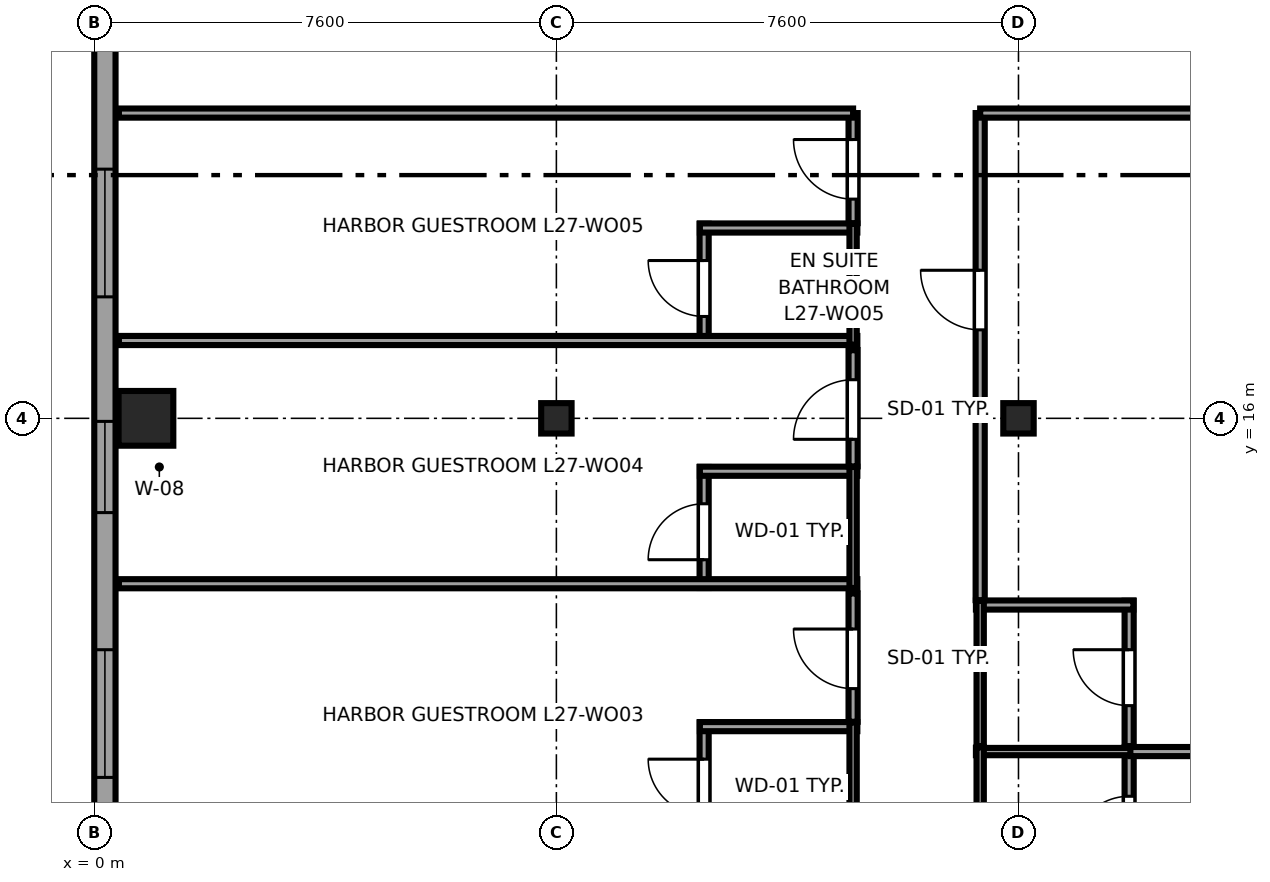
"""IFC4 building model, lengths in metres.
Left out: names, types, materials, properties, quantities, classifications, styles, units other than length and angle.
Written with IfcOpenShell. Run it as: python <this file> out.ifc"""

import sys

from ifc_helpers import new_model, si_unit, direction, frame, frame_2d, origin, origin_2d, place, context, subcontext, project, spatial, rectangle, i_section, extrude, source, transform, mapped, element, fill, save


model = new_model("IFC4")
c1 = context("Model", 3, precision=1e-05, world=origin(), true_north=direction((0.0, 1.0)))
c2 = subcontext(c1, "Body", "Model", "MODEL_VIEW")
j1 = project(units=[si_unit("LENGTHUNIT", "METRE"), si_unit("PLANEANGLEUNIT", "RADIAN")], contexts=[c1])
p1 = place(None, origin())
s1 = spatial("IfcSite", under=j1, at=p1, CompositionType="ELEMENT")
p2 = place(p1, origin())
s2 = spatial("IfcBuilding", under=s1, at=p2, CompositionType="ELEMENT")
p3 = place(p2, frame((0.0, 0.0, 108.0)))
s3 = spatial("IfcBuildingStorey", under=s2, at=p3, CompositionType="ELEMENT", Elevation=108.0)
m1 = source(origin(), c2, "Body", "SweptSolid", [
    extrude(rectangle(XDim=0.9, YDim=0.9, at=origin_2d()), origin(), (0.0, 0.0, 1.0), 3.55),
])
p4 = place(p3, frame((0.85, 16.0, 0.0), z_axis=(0.0, 0.0, 1.0), x_axis=(1.0, 0.0, 0.0)))
e1 = element("IfcColumn", 1, at=p4, inside=s3, PredefinedType="COLUMN", context=c2, shape_type="MappedRepresentation", body=[
    mapped(m1, transform((0.0, 0.0, 0.0), x_axis=(1.0, 0.0, 0.0), y_axis=(0.0, 1.0, 0.0), z_axis=(0.0, 0.0, 1.0), scale=1.0)),
])
m2 = source(origin(), c2, "Body", "SweptSolid", [
    extrude(i_section(OverallWidth=0.5, OverallDepth=0.5, WebThickness=0.022, FlangeThickness=0.034, at=origin_2d()), origin(), (0.0, 0.0, 1.0), 3.55),
])
for number, where, z_axis, x_axis in (
    (2, (7.6, 16.0, 0.0), (0.0, 0.0, 1.0), (1.0, 0.0, 0.0)),
    (3, (15.2, 16.0, 0.0), (0.0, 0.0, 1.0), (1.0, 0.0, 0.0)),
):
    element("IfcColumn", number, at=place(p3, frame(where, z_axis=z_axis, x_axis=x_axis)), inside=s3, PredefinedType="COLUMN", context=c2, shape_type="MappedRepresentation", body=[
        mapped(m2, transform((0.0, 0.0, 0.0), x_axis=(1.0, 0.0, 0.0), y_axis=(0.0, 1.0, 0.0), z_axis=(0.0, 0.0, 1.0), scale=1.0)),
    ])
p5 = place(p3, frame((0.175, 41.383, 0.0), z_axis=(0.0, 0.0, 1.0), x_axis=(0.0, -1.0, 0.0)))
e4 = element("IfcWall", 4, at=p5, inside=s3, PredefinedType="SOLIDWALL", context=c2, shape_type="SweptSolid", body=[
    extrude(rectangle(XDim=36.766, YDim=0.35, at=frame_2d((18.383, 0.0))), origin(), (0.0, 0.0, 1.0), 3.37),
])
p6 = place(p5, frame((4.428, 0.0, 0.68)))
e5 = element("IfcOpeningElement", 5, at=p6, cuts=e4, PredefinedType="OPENING", context=c2, shape_type="SweptSolid", body=[
    extrude(rectangle(XDim=2.1, YDim=1.9, at=frame_2d((1.05, 0.95))), frame((0.0, 0.185, 0.0), z_axis=(0.0, -1.0, 0.0), x_axis=(1.0, 0.0, 0.0)), (0.0, 0.0, 1.0), 0.37),
])
p7 = place(p5, frame((10.479, 0.0, 0.68)))
e6 = element("IfcOpeningElement", 6, at=p7, cuts=e4, PredefinedType="OPENING", context=c2, shape_type="SweptSolid", body=[
    extrude(rectangle(XDim=2.1, YDim=1.9, at=frame_2d((1.05, 0.95))), frame((0.0, 0.185, 0.0), z_axis=(0.0, -1.0, 0.0), x_axis=(1.0, 0.0, 0.0)), (0.0, 0.0, 1.0), 0.37),
])
p8 = place(p5, frame((13.381, 0.0, 0.68)))
e7 = element("IfcOpeningElement", 7, at=p8, cuts=e4, PredefinedType="OPENING", context=c2, shape_type="SweptSolid", body=[
    extrude(rectangle(XDim=2.1, YDim=1.9, at=frame_2d((1.05, 0.95))), frame((0.0, 0.185, 0.0), z_axis=(0.0, -1.0, 0.0), x_axis=(1.0, 0.0, 0.0)), (0.0, 0.0, 1.0), 0.37),
])
p9 = place(p5, frame((21.285, 0.0, 0.68)))
e8 = element("IfcOpeningElement", 8, at=p9, cuts=e4, PredefinedType="OPENING", context=c2, shape_type="SweptSolid", body=[
    extrude(rectangle(XDim=2.1, YDim=1.9, at=frame_2d((1.05, 0.95))), frame((0.0, 0.185, 0.0), z_axis=(0.0, -1.0, 0.0), x_axis=(1.0, 0.0, 0.0)), (0.0, 0.0, 1.0), 0.37),
])
p10 = place(p5, frame((29.188, 0.0, 0.68)))
e9 = element("IfcOpeningElement", 9, at=p10, cuts=e4, PredefinedType="OPENING", context=c2, shape_type="SweptSolid", body=[
    extrude(rectangle(XDim=2.1, YDim=1.9, at=frame_2d((1.05, 0.95))), frame((0.0, 0.185, 0.0), z_axis=(0.0, -1.0, 0.0), x_axis=(1.0, 0.0, 0.0)), (0.0, 0.0, 1.0), 0.37),
])
p11 = place(p5, frame((33.779, 0.0, 0.62)))
e10 = element("IfcOpeningElement", 10, at=p11, cuts=e4, PredefinedType="OPENING", context=c2, shape_type="SweptSolid", body=[
    extrude(rectangle(XDim=1.5, YDim=1.55, at=frame_2d((0.75, 0.775))), frame((0.0, 0.185, 0.0), z_axis=(0.0, -1.0, 0.0), x_axis=(1.0, 0.0, 0.0)), (0.0, 0.0, 1.0), 0.37),
])
p12 = place(p5, frame((25.433, 0.0, 0.62)))
e11 = element("IfcOpeningElement", 11, at=p12, cuts=e4, PredefinedType="OPENING", context=c2, shape_type="SweptSolid", body=[
    extrude(rectangle(XDim=1.5, YDim=1.55, at=frame_2d((0.75, 0.775))), frame((0.0, 0.185, 0.0), z_axis=(0.0, -1.0, 0.0), x_axis=(1.0, 0.0, 0.0)), (0.0, 0.0, 1.0), 0.37),
])
p13 = place(p3, frame((10.03, 9.01, 0.0), z_axis=(0.0, 0.0, 1.0), x_axis=(0.0, 1.0, 0.0)))
e12 = element("IfcWall", 12, at=p13, inside=s3, PredefinedType="PARTITIONING", context=c2, shape_type="SweptSolid", body=[
    extrude(rectangle(XDim=1.99, YDim=0.15, at=frame_2d((0.995, 0.0))), origin(), (0.0, 0.0, 1.0), 3.37),
])
p14 = place(p13, frame((0.465, 0.0, 0.0)))
e13 = element("IfcOpeningElement", 13, at=p14, cuts=e12, PredefinedType="OPENING", context=c2, shape_type="SweptSolid", body=[
    extrude(rectangle(XDim=0.92, YDim=2.01, at=frame_2d((0.46, 1.005))), frame((0.0, 0.085, 0.0), z_axis=(0.0, -1.0, 0.0), x_axis=(1.0, 0.0, 0.0)), (0.0, 0.0, 1.0), 0.17),
])
p15 = place(p3, frame((9.96, 10.93, 0.0), z_axis=(0.0, 0.0, 1.0), x_axis=(1.0, 0.0, 0.0)))
e14 = element("IfcWall", 14, at=p15, inside=s3, PredefinedType="PARTITIONING", context=c2, shape_type="SweptSolid", body=[
    extrude(rectangle(XDim=2.59, YDim=0.15, at=frame_2d((1.295, 0.0))), origin(), (0.0, 0.0, 1.0), 3.37),
])
p16 = place(p3, frame((12.48, 9.01, 0.0), z_axis=(0.0, 0.0, 1.0), x_axis=(0.0, 1.0, 0.0)))
e15 = element("IfcWall", 15, at=p16, inside=s3, PredefinedType="PLUMBINGWALL", context=c2, shape_type="SweptSolid", body=[
    extrude(rectangle(XDim=1.99, YDim=0.12, at=frame_2d((0.995, 0.0))), origin(), (0.0, 0.0, 1.0), 3.37),
])
p17 = place(p3, frame((10.03, 13.21, 0.0), z_axis=(0.0, 0.0, 1.0), x_axis=(0.0, 1.0, 0.0)))
e16 = element("IfcWall", 16, at=p17, inside=s3, PredefinedType="PARTITIONING", context=c2, shape_type="SweptSolid", body=[
    extrude(rectangle(XDim=1.99, YDim=0.15, at=frame_2d((0.995, 0.0))), origin(), (0.0, 0.0, 1.0), 3.37),
])
p18 = place(p17, frame((0.465, 0.0, 0.0)))
e17 = element("IfcOpeningElement", 17, at=p18, cuts=e16, PredefinedType="OPENING", context=c2, shape_type="SweptSolid", body=[
    extrude(rectangle(XDim=0.92, YDim=2.01, at=frame_2d((0.46, 1.005))), frame((0.0, 0.085, 0.0), z_axis=(0.0, -1.0, 0.0), x_axis=(1.0, 0.0, 0.0)), (0.0, 0.0, 1.0), 0.17),
])
p19 = place(p3, frame((0.405, 13.28, 0.0), z_axis=(0.0, 0.0, 1.0), x_axis=(1.0, 0.0, 0.0)))
e18 = element("IfcWall", 18, at=p19, inside=s3, PredefinedType="PARTITIONING", context=c2, shape_type="SweptSolid", body=[
    extrude(rectangle(XDim=12.145, YDim=0.15, at=frame_2d((6.073, 0.0))), origin(), (0.0, 0.0, 1.0), 3.37),
])
p20 = place(p3, frame((9.96, 15.13, 0.0), z_axis=(0.0, 0.0, 1.0), x_axis=(1.0, 0.0, 0.0)))
e19 = element("IfcWall", 19, at=p20, inside=s3, PredefinedType="PARTITIONING", context=c2, shape_type="SweptSolid", body=[
    extrude(rectangle(XDim=2.59, YDim=0.15, at=frame_2d((1.295, 0.0))), origin(), (0.0, 0.0, 1.0), 3.37),
])
p21 = place(p3, frame((12.48, 13.21, 0.0), z_axis=(0.0, 0.0, 1.0), x_axis=(0.0, 1.0, 0.0)))
e20 = element("IfcWall", 20, at=p21, inside=s3, PredefinedType="PLUMBINGWALL", context=c2, shape_type="SweptSolid", body=[
    extrude(rectangle(XDim=1.99, YDim=0.12, at=frame_2d((0.995, 0.0))), origin(), (0.0, 0.0, 1.0), 3.37),
])
p22 = place(p3, frame((10.03, 17.21, 0.0), z_axis=(0.0, 0.0, 1.0), x_axis=(0.0, 1.0, 0.0)))
e21 = element("IfcWall", 21, at=p22, inside=s3, PredefinedType="PARTITIONING", context=c2, shape_type="SweptSolid", body=[
    extrude(rectangle(XDim=1.99, YDim=0.15, at=frame_2d((0.995, 0.0))), origin(), (0.0, 0.0, 1.0), 3.37),
])
p23 = place(p22, frame((0.465, 0.0, 0.0)))
e22 = element("IfcOpeningElement", 22, at=p23, cuts=e21, PredefinedType="OPENING", context=c2, shape_type="SweptSolid", body=[
    extrude(rectangle(XDim=0.92, YDim=2.01, at=frame_2d((0.46, 1.005))), frame((0.0, 0.085, 0.0), z_axis=(0.0, -1.0, 0.0), x_axis=(1.0, 0.0, 0.0)), (0.0, 0.0, 1.0), 0.17),
])
p24 = place(p3, frame((0.405, 17.28, 0.0), z_axis=(0.0, 0.0, 1.0), x_axis=(1.0, 0.0, 0.0)))
e23 = element("IfcWall", 23, at=p24, inside=s3, PredefinedType="PARTITIONING", context=c2, shape_type="SweptSolid", body=[
    extrude(rectangle(XDim=12.145, YDim=0.15, at=frame_2d((6.073, 0.0))), origin(), (0.0, 0.0, 1.0), 3.37),
])
p25 = place(p3, frame((9.96, 19.13, 0.0), z_axis=(0.0, 0.0, 1.0), x_axis=(1.0, 0.0, 0.0)))
e24 = element("IfcWall", 24, at=p25, inside=s3, PredefinedType="PARTITIONING", context=c2, shape_type="SweptSolid", body=[
    extrude(rectangle(XDim=2.59, YDim=0.15, at=frame_2d((1.295, 0.0))), origin(), (0.0, 0.0, 1.0), 3.37),
])
p26 = place(p3, frame((12.48, 17.21, 0.0), z_axis=(0.0, 0.0, 1.0), x_axis=(0.0, 1.0, 0.0)))
e25 = element("IfcWall", 25, at=p26, inside=s3, PredefinedType="PLUMBINGWALL", context=c2, shape_type="SweptSolid", body=[
    extrude(rectangle(XDim=1.99, YDim=0.12, at=frame_2d((0.995, 0.0))), origin(), (0.0, 0.0, 1.0), 3.37),
])
p27 = place(p3, frame((17.02, 8.2, 0.0), z_axis=(0.0, 0.0, 1.0), x_axis=(0.0, 1.0, 0.0)))
e26 = element("IfcWall", 26, at=p27, inside=s3, PredefinedType="PARTITIONING", context=c2, shape_type="SweptSolid", body=[
    extrude(rectangle(XDim=2.39, YDim=0.15, at=frame_2d((1.195, 0.0))), origin(), (0.0, 0.0, 1.0), 3.37),
])
p28 = place(p27, frame((0.665, 0.0, 0.0)))
e27 = element("IfcOpeningElement", 27, at=p28, cuts=e26, PredefinedType="OPENING", context=c2, shape_type="SweptSolid", body=[
    extrude(rectangle(XDim=0.92, YDim=2.01, at=frame_2d((0.46, 1.005))), frame((0.0, 0.085, 0.0), z_axis=(0.0, -1.0, 0.0), x_axis=(1.0, 0.0, 0.0)), (0.0, 0.0, 1.0), 0.17),
])
p29 = place(p3, frame((14.5, 10.52, 0.0), z_axis=(0.0, 0.0, 1.0), x_axis=(1.0, 0.0, 0.0)))
e28 = element("IfcWall", 28, at=p29, inside=s3, PredefinedType="PLUMBINGWALL", context=c2, shape_type="SweptSolid", body=[
    extrude(rectangle(XDim=2.59, YDim=0.12, at=frame_2d((1.295, 0.0))), origin(), (0.0, 0.0, 1.0), 3.37),
])
p30 = place(p3, frame((14.57, 8.2, 0.0), z_axis=(0.0, 0.0, 1.0), x_axis=(0.0, 1.0, 0.0)))
e29 = element("IfcWall", 29, at=p30, inside=s3, PredefinedType="PLUMBINGWALL", context=c2, shape_type="SweptSolid", body=[
    extrude(rectangle(XDim=2.39, YDim=0.12, at=frame_2d((1.195, 0.0))), origin(), (0.0, 0.0, 1.0), 3.37),
])
p31 = place(p3, frame((17.02, 10.61, 0.0), z_axis=(0.0, 0.0, 1.0), x_axis=(0.0, 1.0, 0.0)))
e30 = element("IfcWall", 30, at=p31, inside=s3, PredefinedType="PARTITIONING", context=c2, shape_type="SweptSolid", body=[
    extrude(rectangle(XDim=2.39, YDim=0.15, at=frame_2d((1.195, 0.0))), origin(), (0.0, 0.0, 1.0), 3.37),
])
p32 = place(p31, frame((0.665, 0.0, 0.0)))
e31 = element("IfcOpeningElement", 31, at=p32, cuts=e30, PredefinedType="OPENING", context=c2, shape_type="SweptSolid", body=[
    extrude(rectangle(XDim=0.92, YDim=2.01, at=frame_2d((0.46, 1.005))), frame((0.0, 0.085, 0.0), z_axis=(0.0, -1.0, 0.0), x_axis=(1.0, 0.0, 0.0)), (0.0, 0.0, 1.0), 0.17),
])
p33 = place(p3, frame((14.5, 12.93, 0.0), z_axis=(0.0, 0.0, 1.0), x_axis=(1.0, 0.0, 0.0)))
e32 = element("IfcWall", 32, at=p33, inside=s3, PredefinedType="PARTITIONING", context=c2, shape_type="SweptSolid", body=[
    extrude(rectangle(XDim=2.59, YDim=0.15, at=frame_2d((1.295, 0.0))), origin(), (0.0, 0.0, 1.0), 3.37),
])
p34 = place(p3, frame((14.57, 10.61, 0.0), z_axis=(0.0, 0.0, 1.0), x_axis=(0.0, 1.0, 0.0)))
e33 = element("IfcWall", 33, at=p34, inside=s3, PredefinedType="PLUMBINGWALL", context=c2, shape_type="SweptSolid", body=[
    extrude(rectangle(XDim=2.39, YDim=0.12, at=frame_2d((1.195, 0.0))), origin(), (0.0, 0.0, 1.0), 3.37),
])
p35 = place(p3, frame((12.48, 11.01, 0.0), z_axis=(0.0, 0.0, 1.0), x_axis=(0.0, 1.0, 0.0)))
e34 = element("IfcWall", 34, at=p35, inside=s3, PredefinedType="PARTITIONING", context=c2, shape_type="SweptSolid", body=[
    extrude(rectangle(XDim=2.11, YDim=0.15, at=frame_2d((1.055, 0.0))), origin(), (0.0, 0.0, 1.0), 3.37),
])
p36 = place(p35, frame((0.545, 0.0, 0.0)))
e35 = element("IfcOpeningElement", 35, at=p36, cuts=e34, PredefinedType="OPENING", context=c2, shape_type="SweptSolid", body=[
    extrude(rectangle(XDim=0.98, YDim=2.12, at=frame_2d((0.49, 1.06))), frame((0.0, 0.085, 0.0), z_axis=(0.0, -1.0, 0.0), x_axis=(1.0, 0.0, 0.0)), (0.0, 0.0, 1.0), 0.17),
])
p37 = place(p3, frame((12.48, 15.21, 0.0), z_axis=(0.0, 0.0, 1.0), x_axis=(0.0, 1.0, 0.0)))
e36 = element("IfcWall", 36, at=p37, inside=s3, PredefinedType="PARTITIONING", context=c2, shape_type="SweptSolid", body=[
    extrude(rectangle(XDim=1.91, YDim=0.15, at=frame_2d((0.955, 0.0))), origin(), (0.0, 0.0, 1.0), 3.37),
])
p38 = place(p37, frame((0.445, 0.0, 0.0)))
e37 = element("IfcOpeningElement", 37, at=p38, cuts=e36, PredefinedType="OPENING", context=c2, shape_type="SweptSolid", body=[
    extrude(rectangle(XDim=0.98, YDim=2.12, at=frame_2d((0.49, 1.06))), frame((0.0, 0.085, 0.0), z_axis=(0.0, -1.0, 0.0), x_axis=(1.0, 0.0, 0.0)), (0.0, 0.0, 1.0), 0.17),
])
p39 = place(p3, frame((12.48, 19.21, 0.0), z_axis=(0.0, 0.0, 1.0), x_axis=(0.0, 1.0, 0.0)))
e38 = element("IfcWall", 38, at=p39, inside=s3, PredefinedType="PARTITIONING", context=c2, shape_type="SweptSolid", body=[
    extrude(rectangle(XDim=1.81, YDim=0.15, at=frame_2d((0.905, 0.0))), origin(), (0.0, 0.0, 1.0), 3.37),
])
p40 = place(p39, frame((0.395, 0.0, 0.0)))
e39 = element("IfcOpeningElement", 39, at=p40, cuts=e38, PredefinedType="OPENING", context=c2, shape_type="SweptSolid", body=[
    extrude(rectangle(XDim=0.98, YDim=2.12, at=frame_2d((0.49, 1.06))), frame((0.0, 0.085, 0.0), z_axis=(0.0, -1.0, 0.0), x_axis=(1.0, 0.0, 0.0)), (0.0, 0.0, 1.0), 0.17),
])
p41 = place(p3, frame((0.405, 21.02, 0.0), z_axis=(0.0, 0.0, 1.0), x_axis=(1.0, 0.0, 0.0)))
e40 = element("IfcWall", 40, at=p41, inside=s3, PredefinedType="PARTITIONING", context=c2, shape_type="SweptSolid", body=[
    extrude(rectangle(XDim=12.075, YDim=0.15, at=frame_2d((6.038, 0.0))), origin(), (0.0, 0.0, 1.0), 3.37),
])
p42 = place(p3, frame((17.04, 10.52, 0.0), z_axis=(0.0, 0.0, 1.0), x_axis=(1.0, 0.0, 0.0)))
e41 = element("IfcWall", 41, at=p42, inside=s3, PredefinedType="PARTITIONING", context=c2, shape_type="SweptSolid", body=[
    extrude(rectangle(XDim=5.31, YDim=0.15, at=frame_2d((2.655, 0.0))), origin(), (0.0, 0.0, 1.0), 3.37),
])
p43 = place(p3, frame((14.57, 13.01, 0.0), z_axis=(0.0, 0.0, 1.0), x_axis=(0.0, 1.0, 0.0)))
e42 = element("IfcWall", 42, at=p43, inside=s3, PredefinedType="PARTITIONING", context=c2, shape_type="SweptSolid", body=[
    extrude(rectangle(XDim=8.01, YDim=0.15, at=frame_2d((4.005, 0.0))), origin(), (0.0, 0.0, 1.0), 3.37),
])
p44 = place(p43, frame((4.445, 0.0, 0.0)))
e43 = element("IfcOpeningElement", 43, at=p44, cuts=e42, PredefinedType="OPENING", context=c2, shape_type="SweptSolid", body=[
    extrude(rectangle(XDim=0.98, YDim=2.12, at=frame_2d((0.49, 1.06))), frame((0.0, 0.085, 0.0), z_axis=(0.0, -1.0, 0.0), x_axis=(1.0, 0.0, 0.0)), (0.0, 0.0, 1.0), 0.17),
])
p45 = place(p3, frame((14.57, 21.02, 0.0), z_axis=(0.0, 0.0, 1.0), x_axis=(1.0, 0.0, 0.0)))
e44 = element("IfcWall", 44, at=p45, inside=s3, PredefinedType="PARTITIONING", context=c2, shape_type="SweptSolid", body=[
    extrude(rectangle(XDim=7.78, YDim=0.15, at=frame_2d((3.89, 0.0))), origin(), (0.0, 0.0, 1.0), 3.37),
])
m3 = source(origin(), c2, "Body", "SweptSolid", [
    extrude(rectangle(XDim=2.1, YDim=1.9, at=frame_2d((1.05, 0.95))), frame((0.0, 0.09, 0.0), z_axis=(0.0, -1.0, 0.0), x_axis=(1.0, 0.0, 0.0)), (0.0, 0.0, 1.0), 0.06),
])
p46 = place(p9, origin())
e45 = element("IfcWindow", 45, at=p46, inside=s3, PartitioningType="TRIPLE_PANEL_HORIZONTAL", PredefinedType="WINDOW", context=c2, shape_type="MappedRepresentation", body=[
    mapped(m3, transform((0.0, 0.0, 0.0), x_axis=(1.0, 0.0, 0.0), y_axis=(0.0, 1.0, 0.0), z_axis=(0.0, 0.0, 1.0), scale=1.0)),
])
fill(e8, e45)
p47 = place(p10, origin())
e46 = element("IfcWindow", 46, at=p47, inside=s3, PartitioningType="TRIPLE_PANEL_HORIZONTAL", PredefinedType="WINDOW", context=c2, shape_type="MappedRepresentation", body=[
    mapped(m3, transform((0.0, 0.0, 0.0), x_axis=(1.0, 0.0, 0.0), y_axis=(0.0, 1.0, 0.0), z_axis=(0.0, 0.0, 1.0), scale=1.0)),
])
fill(e9, e46)
m4 = source(origin(), c2, "Body", "SweptSolid", [
    extrude(rectangle(XDim=1.5, YDim=1.55, at=frame_2d((0.75, 0.775))), frame((0.0, 0.09, 0.0), z_axis=(0.0, -1.0, 0.0), x_axis=(1.0, 0.0, 0.0)), (0.0, 0.0, 1.0), 0.06),
])
p48 = place(p12, origin())
e47 = element("IfcWindow", 47, at=p48, inside=s3, PartitioningType="SINGLE_PANEL", PredefinedType="WINDOW", context=c2, shape_type="MappedRepresentation", body=[
    mapped(m4, transform((0.0, 0.0, 0.0), x_axis=(1.0, 0.0, 0.0), y_axis=(0.0, 1.0, 0.0), z_axis=(0.0, 0.0, 1.0), scale=1.0)),
])
fill(e11, e47)
m5 = source(origin(), c2, "Body", "SweptSolid", [
    extrude(rectangle(XDim=0.92, YDim=2.01, at=frame_2d((0.46, 1.005))), frame((0.0, 0.025, 0.0), z_axis=(0.0, -1.0, 0.0), x_axis=(1.0, 0.0, 0.0)), (0.0, 0.0, 1.0), 0.05),
])
p49 = place(p14, origin())
e48 = element("IfcDoor", 48, at=p49, inside=s3, OperationType="SINGLE_SWING_RIGHT", PredefinedType="DOOR", context=c2, shape_type="MappedRepresentation", body=[
    mapped(m5, transform((0.0, 0.0, 0.0), x_axis=(1.0, 0.0, 0.0), y_axis=(0.0, 1.0, 0.0), z_axis=(0.0, 0.0, 1.0), scale=1.0)),
])
fill(e13, e48)
p50 = place(p18, origin())
e49 = element("IfcDoor", 49, at=p50, inside=s3, OperationType="SINGLE_SWING_LEFT", PredefinedType="DOOR", context=c2, shape_type="MappedRepresentation", body=[
    mapped(m5, transform((0.0, 0.0, 0.0), x_axis=(1.0, 0.0, 0.0), y_axis=(0.0, 1.0, 0.0), z_axis=(0.0, 0.0, 1.0), scale=1.0)),
])
fill(e17, e49)
p51 = place(p23, origin())
e50 = element("IfcDoor", 50, at=p51, inside=s3, OperationType="SINGLE_SWING_RIGHT", PredefinedType="DOOR", context=c2, shape_type="MappedRepresentation", body=[
    mapped(m5, transform((0.0, 0.0, 0.0), x_axis=(1.0, 0.0, 0.0), y_axis=(0.0, 1.0, 0.0), z_axis=(0.0, 0.0, 1.0), scale=1.0)),
])
fill(e22, e50)
p52 = place(p28, origin())
e51 = element("IfcDoor", 51, at=p52, inside=s3, OperationType="SINGLE_SWING_LEFT", PredefinedType="DOOR", context=c2, shape_type="MappedRepresentation", body=[
    mapped(m5, transform((0.0, 0.0, 0.0), x_axis=(1.0, 0.0, 0.0), y_axis=(0.0, 1.0, 0.0), z_axis=(0.0, 0.0, 1.0), scale=1.0)),
])
fill(e27, e51)
p53 = place(p32, origin())
e52 = element("IfcDoor", 52, at=p53, inside=s3, OperationType="SINGLE_SWING_RIGHT", PredefinedType="DOOR", context=c2, shape_type="MappedRepresentation", body=[
    mapped(m5, transform((0.0, 0.0, 0.0), x_axis=(1.0, 0.0, 0.0), y_axis=(0.0, 1.0, 0.0), z_axis=(0.0, 0.0, 1.0), scale=1.0)),
])
fill(e31, e52)
m6 = source(origin(), c2, "Body", "SweptSolid", [
    extrude(rectangle(XDim=0.98, YDim=2.12, at=frame_2d((0.49, 1.06))), frame((0.0, 0.025, 0.0), z_axis=(0.0, -1.0, 0.0), x_axis=(1.0, 0.0, 0.0)), (0.0, 0.0, 1.0), 0.05),
])
p54 = place(p36, origin())
e53 = element("IfcDoor", 53, at=p54, inside=s3, OperationType="SINGLE_SWING_RIGHT", PredefinedType="DOOR", context=c2, shape_type="MappedRepresentation", body=[
    mapped(m6, transform((0.0, 0.0, 0.0), x_axis=(1.0, 0.0, 0.0), y_axis=(0.0, 1.0, 0.0), z_axis=(0.0, 0.0, 1.0), scale=1.0)),
])
fill(e35, e53)
p55 = place(p38, origin())
e54 = element("IfcDoor", 54, at=p55, inside=s3, OperationType="SINGLE_SWING_LEFT", PredefinedType="DOOR", context=c2, shape_type="MappedRepresentation", body=[
    mapped(m6, transform((0.0, 0.0, 0.0), x_axis=(1.0, 0.0, 0.0), y_axis=(0.0, 1.0, 0.0), z_axis=(0.0, 0.0, 1.0), scale=1.0)),
])
fill(e37, e54)
p56 = place(p40, origin())
e55 = element("IfcDoor", 55, at=p56, inside=s3, OperationType="SINGLE_SWING_RIGHT", PredefinedType="DOOR", context=c2, shape_type="MappedRepresentation", body=[
    mapped(m6, transform((0.0, 0.0, 0.0), x_axis=(1.0, 0.0, 0.0), y_axis=(0.0, 1.0, 0.0), z_axis=(0.0, 0.0, 1.0), scale=1.0)),
])
fill(e39, e55)
p57 = place(p44, origin())
e56 = element("IfcDoor", 56, at=p57, inside=s3, OperationType="SINGLE_SWING_RIGHT", PredefinedType="DOOR", context=c2, shape_type="MappedRepresentation", body=[
    mapped(m6, transform((0.0, 0.0, 0.0), x_axis=(1.0, 0.0, 0.0), y_axis=(0.0, 1.0, 0.0), z_axis=(0.0, 0.0, 1.0), scale=1.0)),
])
fill(e43, e56)
save(model, sys.argv[1])
